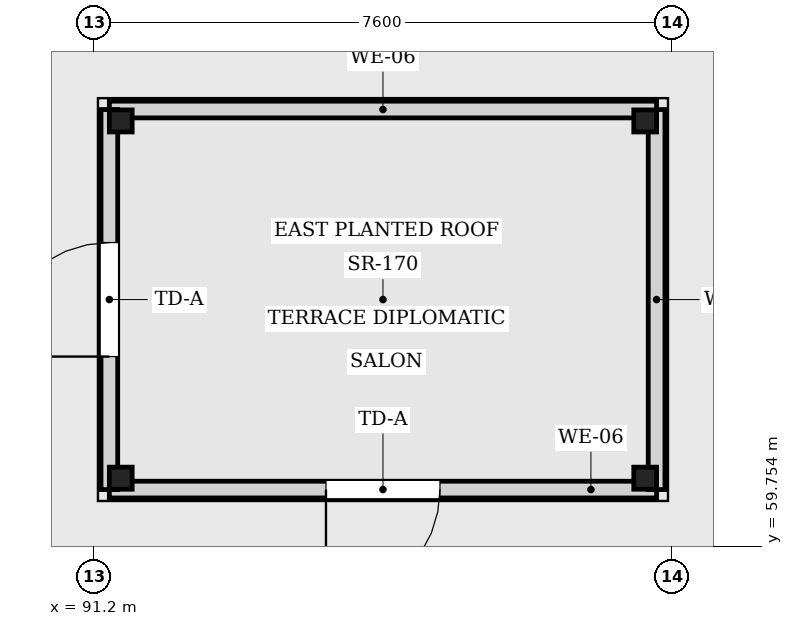
"""IFC4 building model, lengths in metres.
Left out: names, types, materials, properties, quantities, classifications, styles, units other than length and angle.
Written with IfcOpenShell. Run it as: python <this file> out.ifc"""

import sys

from ifc_helpers import new_model, si_unit, direction, frame, frame_2d, origin, origin_2d, place, context, subcontext, project, spatial, rectangle, i_section, extrude, element, fill, save


model = new_model("IFC4")
c1 = context("Model", 3, precision=1e-05, world=origin(), true_north=direction((0.0, 1.0)))
c2 = subcontext(c1, "Body", "Model", "MODEL_VIEW")
j1 = project(units=[si_unit("LENGTHUNIT", "METRE"), si_unit("PLANEANGLEUNIT", "RADIAN")], contexts=[c1])
p1 = place(None, origin())
s1 = spatial("IfcSite", under=j1, at=p1, CompositionType="ELEMENT")
p2 = place(p1, origin())
s2 = spatial("IfcBuilding", under=s1, at=p2, CompositionType="ELEMENT")
p3 = place(p2, frame((0.0, 0.0, 25.35)))
s3 = spatial("IfcBuildingStorey", under=s2, at=p3, CompositionType="ELEMENT", Elevation=25.35)
p4 = place(p3, frame((91.55, 60.65, 0.0), z_axis=(0.0, 0.0, 1.0), x_axis=(1.0, 0.0, 0.0)))
e1 = element("IfcColumn", 1, at=p4, inside=s3, PredefinedType="COLUMN", context=c2, shape_type="SweptSolid", body=[
    extrude(i_section(OverallWidth=0.3, OverallDepth=0.29, WebThickness=0.009, FlangeThickness=0.014, at=origin_2d()), origin(), (0.0, 0.0, 1.0), 3.0),
])
for number, where, z_axis, x_axis in (
    (2, (98.45, 60.65, 0.0), (0.0, 0.0, 1.0), (1.0, 0.0, 0.0)),
    (3, (98.45, 65.35, 0.0), (0.0, 0.0, 1.0), (1.0, 0.0, 0.0)),
):
    element("IfcColumn", number, at=place(p3, frame(where, z_axis=z_axis, x_axis=x_axis)), inside=s3, PredefinedType="COLUMN", context=c2, shape_type="SweptSolid", body=[
        extrude(i_section(OverallWidth=0.3, OverallDepth=0.29, WebThickness=0.009, FlangeThickness=0.014, at=origin_2d()), origin(), (0.0, 0.0, 1.0), 4.862),
    ])
p5 = place(p3, frame((91.55, 65.35, 0.0), z_axis=(0.0, 0.0, 1.0), x_axis=(1.0, 0.0, 0.0)))
e4 = element("IfcColumn", 4, at=p5, inside=s3, PredefinedType="COLUMN", context=c2, shape_type="SweptSolid", body=[
    extrude(i_section(OverallWidth=0.3, OverallDepth=0.29, WebThickness=0.009, FlangeThickness=0.014, at=origin_2d()), origin(), (0.0, 0.0, 1.0), 3.0),
])
p6 = place(p3, frame((98.6, 60.5, 0.0), z_axis=(0.0, 0.0, 1.0), x_axis=(-1.0, 0.0, 0.0)))
e5 = element("IfcWall", 5, at=p6, inside=s3, PredefinedType="STANDARD", context=c2, shape_type="SweptSolid", body=[
    extrude(rectangle(XDim=7.2, YDim=0.22, at=frame_2d((3.6, 0.0))), origin(), (0.0, 0.0, 1.0), 3.931),
])
p7 = place(p6, frame((2.85, 0.0, 0.0)))
e6 = element("IfcOpeningElement", 6, at=p7, cuts=e5, PredefinedType="OPENING", context=c2, shape_type="SweptSolid", body=[
    extrude(rectangle(XDim=1.5, YDim=2.2, at=frame_2d((0.75, 1.1))), frame((0.0, 0.12, 0.0), z_axis=(0.0, -1.0, 0.0), x_axis=(1.0, 0.0, 0.0)), (0.0, 0.0, 1.0), 0.24),
])
p8 = place(p3, frame((98.6, 65.5, 0.0), z_axis=(0.0, 0.0, 1.0), x_axis=(0.0, -1.0, 0.0)))
e7 = element("IfcWall", 7, at=p8, inside=s3, PredefinedType="STANDARD", context=c2, shape_type="SweptSolid", body=[
    extrude(rectangle(XDim=5.0, YDim=0.22, at=frame_2d((2.5, 0.0))), origin(), (0.0, 0.0, 1.0), 4.682),
])
p9 = place(p3, frame((91.4, 65.5, 0.0), z_axis=(0.0, 0.0, 1.0), x_axis=(1.0, 0.0, 0.0)))
e8 = element("IfcWall", 8, at=p9, inside=s3, PredefinedType="STANDARD", context=c2, shape_type="SweptSolid", body=[
    extrude(rectangle(XDim=7.2, YDim=0.22, at=frame_2d((3.6, 0.0))), origin(), (0.0, 0.0, 1.0), 3.0),
])
p10 = place(p3, frame((91.4, 60.5, 0.0), z_axis=(0.0, 0.0, 1.0), x_axis=(0.0, 1.0, 0.0)))
e9 = element("IfcWall", 9, at=p10, inside=s3, PredefinedType="STANDARD", context=c2, shape_type="SweptSolid", body=[
    extrude(rectangle(XDim=5.0, YDim=0.22, at=frame_2d((2.5, 0.0))), origin(), (0.0, 0.0, 1.0), 3.0),
])
p11 = place(p10, frame((1.75, 0.0, 0.0)))
e10 = element("IfcOpeningElement", 10, at=p11, cuts=e9, PredefinedType="OPENING", context=c2, shape_type="SweptSolid", body=[
    extrude(rectangle(XDim=1.5, YDim=2.2, at=frame_2d((0.75, 1.1))), frame((0.0, 0.12, 0.0), z_axis=(0.0, -1.0, 0.0), x_axis=(1.0, 0.0, 0.0)), (0.0, 0.0, 1.0), 0.24),
])
p12 = place(p7, origin())
e11 = element("IfcDoor", 11, at=p12, inside=s3, OperationType="SINGLE_SWING_RIGHT", PredefinedType="DOOR", context=c2, shape_type="SweptSolid", body=[
    extrude(rectangle(XDim=1.5, YDim=2.2, at=frame_2d((0.75, 1.1))), frame((0.0, 0.025, 0.0), z_axis=(0.0, -1.0, 0.0), x_axis=(1.0, 0.0, 0.0)), (0.0, 0.0, 1.0), 0.05),
])
fill(e6, e11)
p13 = place(p11, origin())
e12 = element("IfcDoor", 12, at=p13, inside=s3, OperationType="SINGLE_SWING_LEFT", PredefinedType="DOOR", context=c2, shape_type="SweptSolid", body=[
    extrude(rectangle(XDim=1.5, YDim=2.2, at=frame_2d((0.75, 1.1))), frame((0.0, 0.025, 0.0), z_axis=(0.0, -1.0, 0.0), x_axis=(1.0, 0.0, 0.0)), (0.0, 0.0, 1.0), 0.05),
])
fill(e10, e12)
save(model, sys.argv[1])
